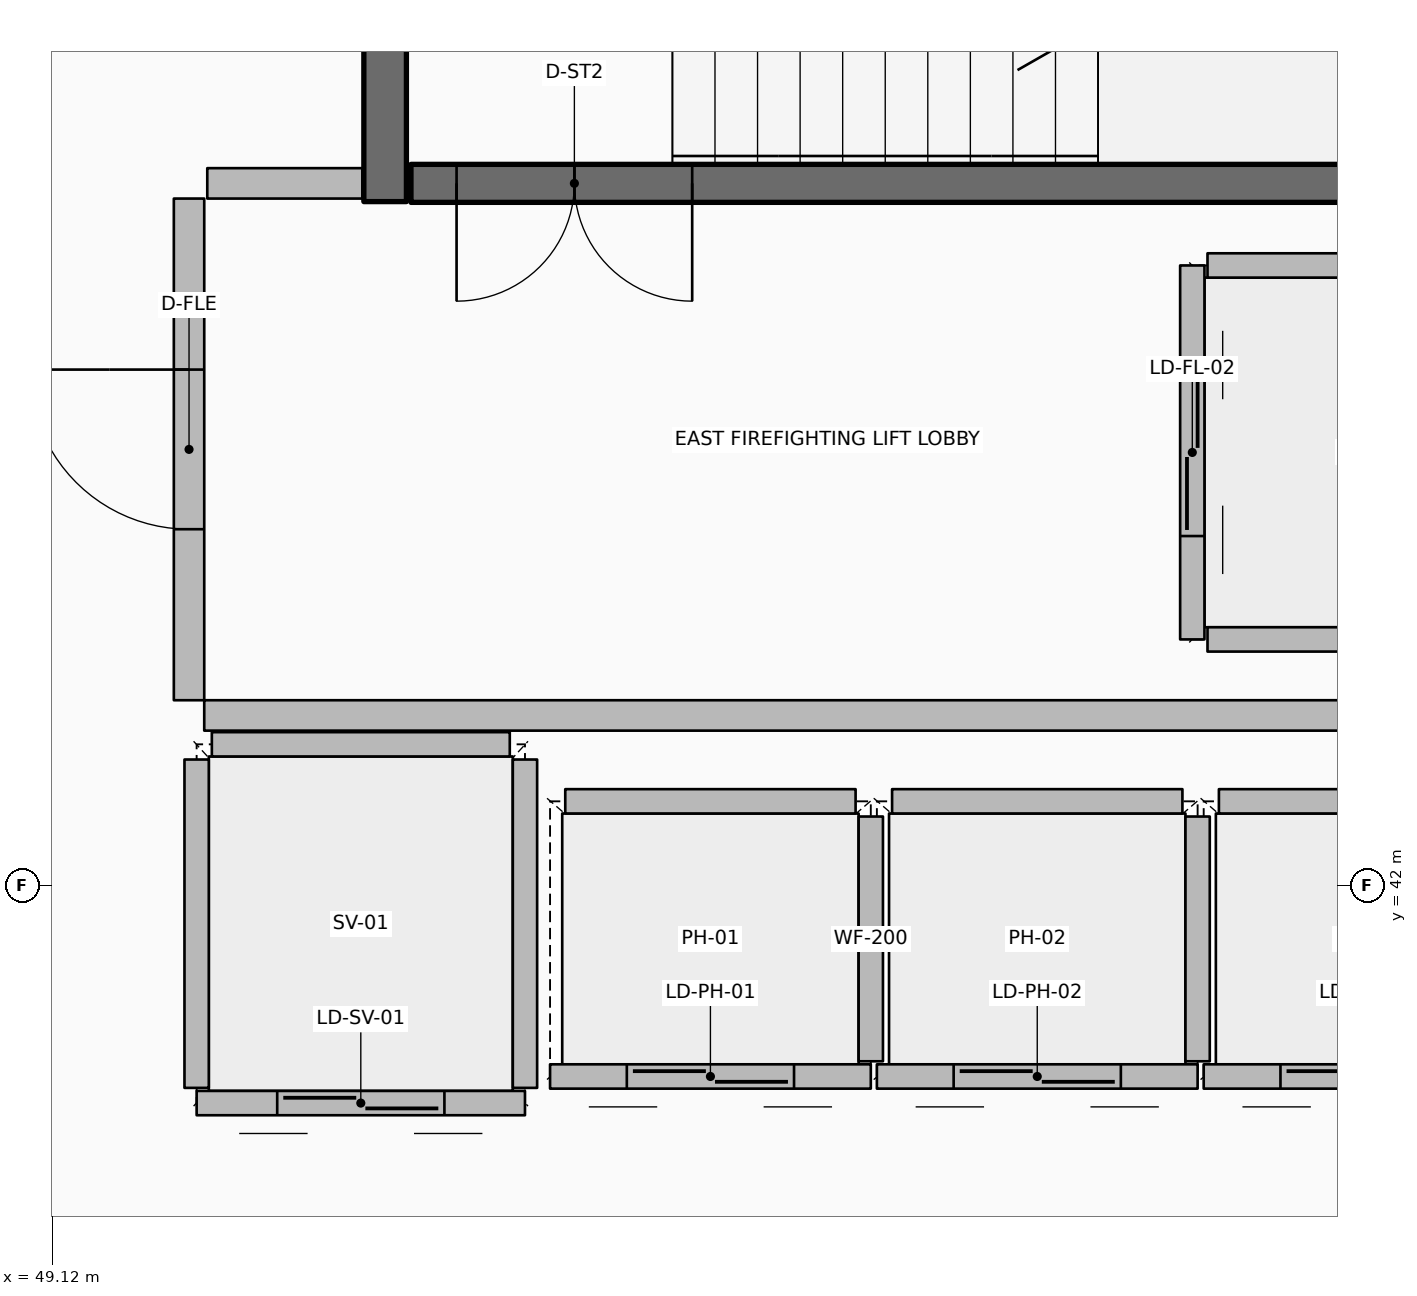
"""IFC4 building model, lengths in metres.
Left out: names, types, materials, properties, quantities, classifications, styles, units other than length and angle.
Written with IfcOpenShell. Run it as: python <this file> out.ifc"""

import sys

from ifc_helpers import new_model, si_unit, direction, frame, frame_2d, origin, origin_2d, place, context, subcontext, project, spatial, rectangle, hollow_rectangle, extrude, element, fill, save


model = new_model("IFC4")
c1 = context("Model", 3, precision=1e-05, world=origin(), true_north=direction((0.0, 1.0)))
c2 = subcontext(c1, "Body", "Model", "MODEL_VIEW")
j1 = project(units=[si_unit("LENGTHUNIT", "METRE"), si_unit("PLANEANGLEUNIT", "RADIAN")], contexts=[c1])
p1 = place(None, origin())
s1 = spatial("IfcSite", under=j1, at=p1, CompositionType="ELEMENT")
p2 = place(p1, origin())
s2 = spatial("IfcBuilding", under=s1, at=p2, CompositionType="ELEMENT")
p3 = place(p2, frame((0.0, 0.0, 236.7)))
s3 = spatial("IfcBuildingStorey", under=s2, at=p3, CompositionType="ELEMENT", Elevation=236.7)
p4 = place(p3, frame((51.31, 46.5, 0.0), z_axis=(0.0, 0.0, 1.0), x_axis=(0.0, 1.0, 0.0)))
e1 = element("IfcWall", 1, at=p4, inside=s3, PredefinedType="SHEAR", context=c2, shape_type="SweptSolid", body=[
    extrude(rectangle(XDim=3.5, YDim=0.28, at=frame_2d((1.75, 0.0))), origin(), (0.0, 0.0, 1.0), 3.85),
])
p5 = place(p3, frame((56.0, 46.62, 0.0), z_axis=(0.0, 0.0, 1.0), x_axis=(1.0, 0.0, 0.0)))
e2 = element("IfcColumn", 2, at=p5, inside=s3, PredefinedType="COLUMN", context=c2, shape_type="SweptSolid", body=[
    extrude(hollow_rectangle(XDim=0.2, YDim=0.2, WallThickness=0.01, InnerFilletRadius=0.01, OuterFilletRadius=0.02, at=origin_2d()), origin(), (0.0, 0.0, 1.0), 1.72),
])
p6 = place(p3, frame((51.48, 46.62, 0.0), z_axis=(0.0, 0.0, 1.0), x_axis=(1.0, 0.0, 0.0)))
e3 = element("IfcWall", 3, at=p6, inside=s3, PredefinedType="SOLIDWALL", context=c2, shape_type="SweptSolid", body=[
    extrude(rectangle(XDim=7.54, YDim=0.25, at=frame_2d((3.77, 0.0))), origin(), (0.0, 0.0, 1.0), 3.59),
])
p7 = place(p6, frame((0.3, 0.0, 0.0)))
e4 = element("IfcOpeningElement", 4, at=p7, cuts=e3, PredefinedType="OPENING", context=c2, shape_type="SweptSolid", body=[
    extrude(rectangle(XDim=1.55, YDim=2.15, at=frame_2d((0.775, 1.075))), frame((0.0, 0.135, 0.0), z_axis=(0.0, -1.0, 0.0), x_axis=(1.0, 0.0, 0.0)), (0.0, 0.0, 1.0), 0.27),
])
p8 = place(p3, frame((54.505, 40.745, 0.0), z_axis=(0.0, 0.0, 1.0), x_axis=(-1.0, 0.0, 0.0)))
e5 = element("IfcWall", 5, at=p8, inside=s3, PredefinedType="PARTITIONING", context=c2, shape_type="SweptSolid", body=[
    extrude(rectangle(XDim=2.11, YDim=0.16, at=frame_2d((1.055, 0.0))), origin(), (0.0, 0.0, 1.0), 3.59),
])
p9 = place(p8, frame((0.505, 0.0, 0.0)))
e6 = element("IfcOpeningElement", 6, at=p9, cuts=e5, PredefinedType="OPENING", context=c2, shape_type="SweptSolid", body=[
    extrude(rectangle(XDim=1.1, YDim=2.1, at=frame_2d((0.55, 1.05))), frame((0.0, 0.09, 0.0), z_axis=(0.0, -1.0, 0.0), x_axis=(1.0, 0.0, 0.0)), (0.0, 0.0, 1.0), 0.18),
])
p10 = place(p3, frame((54.505, 40.845, 0.0), z_axis=(0.0, 0.0, 1.0), x_axis=(0.0, 1.0, 0.0)))
e7 = element("IfcWall", 7, at=p10, inside=s3, PredefinedType="PARTITIONING", context=c2, shape_type="SweptSolid", body=[
    extrude(rectangle(XDim=1.61, YDim=0.16, at=frame_2d((0.805, 0.0))), origin(), (0.0, 0.0, 1.0), 3.59),
])
p11 = place(p3, frame((52.495, 42.555, 0.0), z_axis=(0.0, 0.0, 1.0), x_axis=(1.0, 0.0, 0.0)))
e8 = element("IfcWall", 8, at=p11, inside=s3, PredefinedType="PARTITIONING", context=c2, shape_type="SweptSolid", body=[
    extrude(rectangle(XDim=1.91, YDim=0.16, at=frame_2d((0.955, 0.0))), origin(), (0.0, 0.0, 1.0), 3.59),
])
p12 = place(p3, frame((56.655, 40.745, 0.0), z_axis=(0.0, 0.0, 1.0), x_axis=(-1.0, 0.0, 0.0)))
e9 = element("IfcWall", 9, at=p12, inside=s3, PredefinedType="PARTITIONING", context=c2, shape_type="SweptSolid", body=[
    extrude(rectangle(XDim=2.11, YDim=0.16, at=frame_2d((1.055, 0.0))), origin(), (0.0, 0.0, 1.0), 3.59),
])
p13 = place(p12, frame((0.505, 0.0, 0.0)))
e10 = element("IfcOpeningElement", 10, at=p13, cuts=e9, PredefinedType="OPENING", context=c2, shape_type="SweptSolid", body=[
    extrude(rectangle(XDim=1.1, YDim=2.1, at=frame_2d((0.55, 1.05))), frame((0.0, 0.09, 0.0), z_axis=(0.0, -1.0, 0.0), x_axis=(1.0, 0.0, 0.0)), (0.0, 0.0, 1.0), 0.18),
])
p14 = place(p3, frame((56.655, 40.845, 0.0), z_axis=(0.0, 0.0, 1.0), x_axis=(0.0, 1.0, 0.0)))
e11 = element("IfcWall", 11, at=p14, inside=s3, PredefinedType="PARTITIONING", context=c2, shape_type="SweptSolid", body=[
    extrude(rectangle(XDim=1.61, YDim=0.16, at=frame_2d((0.805, 0.0))), origin(), (0.0, 0.0, 1.0), 3.59),
])
p15 = place(p3, frame((54.645, 42.555, 0.0), z_axis=(0.0, 0.0, 1.0), x_axis=(1.0, 0.0, 0.0)))
e12 = element("IfcWall", 12, at=p15, inside=s3, PredefinedType="PARTITIONING", context=c2, shape_type="SweptSolid", body=[
    extrude(rectangle(XDim=1.91, YDim=0.16, at=frame_2d((0.955, 0.0))), origin(), (0.0, 0.0, 1.0), 3.59),
])
p16 = place(p3, frame((58.805, 40.745, 0.0), z_axis=(0.0, 0.0, 1.0), x_axis=(-1.0, 0.0, 0.0)))
e13 = element("IfcWall", 13, at=p16, inside=s3, PredefinedType="PARTITIONING", context=c2, shape_type="SweptSolid", body=[
    extrude(rectangle(XDim=2.11, YDim=0.16, at=frame_2d((1.055, 0.0))), origin(), (0.0, 0.0, 1.0), 3.59),
])
p17 = place(p16, frame((0.505, 0.0, 0.0)))
e14 = element("IfcOpeningElement", 14, at=p17, cuts=e13, PredefinedType="OPENING", context=c2, shape_type="SweptSolid", body=[
    extrude(rectangle(XDim=1.1, YDim=2.1, at=frame_2d((0.55, 1.05))), frame((0.0, 0.09, 0.0), z_axis=(0.0, -1.0, 0.0), x_axis=(1.0, 0.0, 0.0)), (0.0, 0.0, 1.0), 0.18),
])
p18 = place(p3, frame((56.795, 42.555, 0.0), z_axis=(0.0, 0.0, 1.0), x_axis=(1.0, 0.0, 0.0)))
e15 = element("IfcWall", 15, at=p18, inside=s3, PredefinedType="PARTITIONING", context=c2, shape_type="SweptSolid", body=[
    extrude(rectangle(XDim=1.91, YDim=0.16, at=frame_2d((0.955, 0.0))), origin(), (0.0, 0.0, 1.0), 3.59),
])
p19 = place(p3, frame((56.62, 46.08, 0.0), z_axis=(0.0, 0.0, 1.0), x_axis=(0.0, -1.0, 0.0)))
e16 = element("IfcWall", 16, at=p19, inside=s3, PredefinedType="PARTITIONING", context=c2, shape_type="SweptSolid", body=[
    extrude(rectangle(XDim=2.46, YDim=0.16, at=frame_2d((1.23, 0.0))), origin(), (0.0, 0.0, 1.0), 3.59),
])
p20 = place(p19, frame((0.68, 0.0, 0.0)))
e17 = element("IfcOpeningElement", 17, at=p20, cuts=e16, PredefinedType="OPENING", context=c2, shape_type="SweptSolid", body=[
    extrude(rectangle(XDim=1.1, YDim=2.1, at=frame_2d((0.55, 1.05))), frame((0.0, 0.09, 0.0), z_axis=(0.0, -1.0, 0.0), x_axis=(1.0, 0.0, 0.0)), (0.0, 0.0, 1.0), 0.18),
])
for number, where, z_axis, x_axis in (
    (18, (56.72, 46.08, 0.0), (0.0, 0.0, 1.0), (1.0, 0.0, 0.0)),
    (19, (56.72, 43.62, 0.0), (0.0, 0.0, 1.0), (1.0, 0.0, 0.0)),
):
    element("IfcWall", number, at=place(p3, frame(where, z_axis=z_axis, x_axis=x_axis)), inside=s3, PredefinedType="PARTITIONING", context=c2, shape_type="SweptSolid", body=[
        extrude(rectangle(XDim=2.06, YDim=0.16, at=frame_2d((1.03, 0.0))), origin(), (0.0, 0.0, 1.0), 3.59),
    ])
p21 = place(p3, frame((52.23, 40.57, 0.0), z_axis=(0.0, 0.0, 1.0), x_axis=(-1.0, 0.0, 0.0)))
e20 = element("IfcWall", 20, at=p21, inside=s3, PredefinedType="PARTITIONING", context=c2, shape_type="SweptSolid", body=[
    extrude(rectangle(XDim=2.16, YDim=0.16, at=frame_2d((1.08, 0.0))), origin(), (0.0, 0.0, 1.0), 3.59),
])
p22 = place(p21, frame((0.53, 0.0, 0.0)))
e21 = element("IfcOpeningElement", 21, at=p22, cuts=e20, PredefinedType="OPENING", context=c2, shape_type="SweptSolid", body=[
    extrude(rectangle(XDim=1.1, YDim=2.1, at=frame_2d((0.55, 1.05))), frame((0.0, 0.09, 0.0), z_axis=(0.0, -1.0, 0.0), x_axis=(1.0, 0.0, 0.0)), (0.0, 0.0, 1.0), 0.18),
])
for number, where, z_axis, x_axis in (
    (22, (52.23, 40.67, 0.0), (0.0, 0.0, 1.0), (0.0, 1.0, 0.0)),
    (23, (50.07, 40.67, 0.0), (0.0, 0.0, 1.0), (0.0, 1.0, 0.0)),
):
    element("IfcWall", number, at=place(p3, frame(where, z_axis=z_axis, x_axis=x_axis)), inside=s3, PredefinedType="PARTITIONING", context=c2, shape_type="SweptSolid", body=[
        extrude(rectangle(XDim=2.16, YDim=0.16, at=frame_2d((1.08, 0.0))), origin(), (0.0, 0.0, 1.0), 3.59),
    ])
p23 = place(p3, frame((50.17, 42.93, 0.0), z_axis=(0.0, 0.0, 1.0), x_axis=(1.0, 0.0, 0.0)))
e24 = element("IfcWall", 24, at=p23, inside=s3, PredefinedType="PARTITIONING", context=c2, shape_type="SweptSolid", body=[
    extrude(rectangle(XDim=1.96, YDim=0.16, at=frame_2d((0.98, 0.0))), origin(), (0.0, 0.0, 1.0), 3.59),
])
p24 = place(p3, frame((50.12, 43.12, 0.0), z_axis=(0.0, 0.0, 1.0), x_axis=(1.0, 0.0, 0.0)))
e25 = element("IfcWall", 25, at=p24, inside=s3, PredefinedType="PARTITIONING", context=c2, shape_type="SweptSolid", body=[
    extrude(rectangle(XDim=8.88, YDim=0.2, at=frame_2d((4.44, 0.0))), origin(), (0.0, 0.0, 1.0), 3.59),
])
p25 = place(p3, frame((50.14, 46.62, 0.0), z_axis=(0.0, 0.0, 1.0), x_axis=(1.0, 0.0, 0.0)))
e26 = element("IfcWall", 26, at=p25, inside=s3, PredefinedType="PARTITIONING", context=c2, shape_type="SweptSolid", body=[
    extrude(rectangle(XDim=1.02, YDim=0.2, at=frame_2d((0.51, 0.0))), origin(), (0.0, 0.0, 1.0), 3.59),
])
p26 = place(p3, frame((50.02, 43.22, 0.0), z_axis=(0.0, 0.0, 1.0), x_axis=(0.0, 1.0, 0.0)))
e27 = element("IfcWall", 27, at=p26, inside=s3, PredefinedType="PARTITIONING", context=c2, shape_type="SweptSolid", body=[
    extrude(rectangle(XDim=3.3, YDim=0.2, at=frame_2d((1.65, 0.0))), origin(), (0.0, 0.0, 1.0), 3.59),
])
p27 = place(p26, frame((1.125, 0.0, 0.0)))
e28 = element("IfcOpeningElement", 28, at=p27, cuts=e27, PredefinedType="OPENING", context=c2, shape_type="SweptSolid", body=[
    extrude(rectangle(XDim=1.05, YDim=2.1, at=frame_2d((0.525, 1.05))), frame((0.0, 0.11, 0.0), z_axis=(0.0, -1.0, 0.0), x_axis=(1.0, 0.0, 0.0)), (0.0, 0.0, 1.0), 0.22),
])
p28 = place(p7, origin())
e29 = element("IfcDoor", 29, at=p28, inside=s3, OperationType="DOUBLE_DOOR_SINGLE_SWING", PredefinedType="DOOR", context=c2, shape_type="SweptSolid", body=[
    extrude(rectangle(XDim=1.55, YDim=2.15, at=frame_2d((0.775, 1.075))), frame((0.0, 0.025, 0.0), z_axis=(0.0, -1.0, 0.0), x_axis=(1.0, 0.0, 0.0)), (0.0, 0.0, 1.0), 0.05),
])
fill(e4, e29)
p29 = place(p9, origin())
e30 = element("IfcDoor", 30, at=p29, inside=s3, OperationType="DOUBLE_DOOR_SLIDING", PredefinedType="DOOR", context=c2, shape_type="SweptSolid", body=[
    extrude(rectangle(XDim=1.1, YDim=2.1, at=frame_2d((0.55, 1.05))), frame((0.0, 0.025, 0.0), z_axis=(0.0, -1.0, 0.0), x_axis=(1.0, 0.0, 0.0)), (0.0, 0.0, 1.0), 0.05),
])
fill(e6, e30)
p30 = place(p13, origin())
e31 = element("IfcDoor", 31, at=p30, inside=s3, OperationType="DOUBLE_DOOR_SLIDING", PredefinedType="DOOR", context=c2, shape_type="SweptSolid", body=[
    extrude(rectangle(XDim=1.1, YDim=2.1, at=frame_2d((0.55, 1.05))), frame((0.0, 0.025, 0.0), z_axis=(0.0, -1.0, 0.0), x_axis=(1.0, 0.0, 0.0)), (0.0, 0.0, 1.0), 0.05),
])
fill(e10, e31)
p31 = place(p17, origin())
e32 = element("IfcDoor", 32, at=p31, inside=s3, OperationType="DOUBLE_DOOR_SLIDING", PredefinedType="DOOR", context=c2, shape_type="SweptSolid", body=[
    extrude(rectangle(XDim=1.1, YDim=2.1, at=frame_2d((0.55, 1.05))), frame((0.0, 0.025, 0.0), z_axis=(0.0, -1.0, 0.0), x_axis=(1.0, 0.0, 0.0)), (0.0, 0.0, 1.0), 0.05),
])
fill(e14, e32)
p32 = place(p20, origin())
e33 = element("IfcDoor", 33, at=p32, inside=s3, OperationType="DOUBLE_DOOR_SLIDING", PredefinedType="DOOR", context=c2, shape_type="SweptSolid", body=[
    extrude(rectangle(XDim=1.1, YDim=2.1, at=frame_2d((0.55, 1.05))), frame((0.0, 0.025, 0.0), z_axis=(0.0, -1.0, 0.0), x_axis=(1.0, 0.0, 0.0)), (0.0, 0.0, 1.0), 0.05),
])
fill(e17, e33)
p33 = place(p22, origin())
e34 = element("IfcDoor", 34, at=p33, inside=s3, OperationType="DOUBLE_DOOR_SLIDING", PredefinedType="DOOR", context=c2, shape_type="SweptSolid", body=[
    extrude(rectangle(XDim=1.1, YDim=2.1, at=frame_2d((0.55, 1.05))), frame((0.0, 0.025, 0.0), z_axis=(0.0, -1.0, 0.0), x_axis=(1.0, 0.0, 0.0)), (0.0, 0.0, 1.0), 0.05),
])
fill(e21, e34)
p34 = place(p27, origin())
e35 = element("IfcDoor", 35, at=p34, inside=s3, OperationType="SINGLE_SWING_LEFT", PredefinedType="DOOR", context=c2, shape_type="SweptSolid", body=[
    extrude(rectangle(XDim=1.05, YDim=2.1, at=frame_2d((0.525, 1.05))), frame((0.0, 0.025, 0.0), z_axis=(0.0, -1.0, 0.0), x_axis=(1.0, 0.0, 0.0)), (0.0, 0.0, 1.0), 0.05),
])
fill(e28, e35)
save(model, sys.argv[1])
